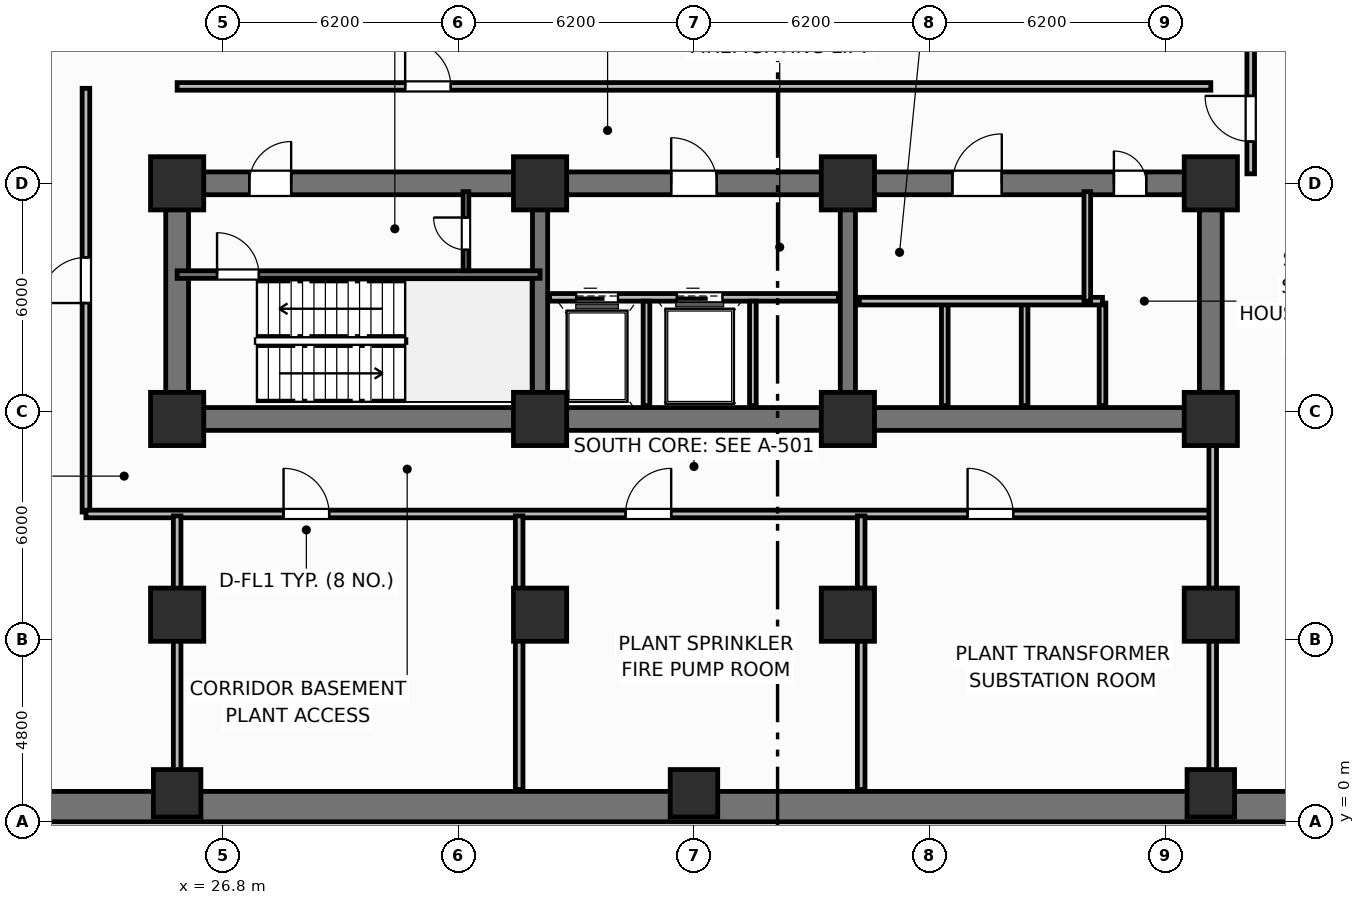
"""IFC4 building model, lengths in metres.
Left out: names, types, materials, properties, quantities, classifications, styles, units other than length and angle.
Written with IfcOpenShell. Run it as: python <this file> out.ifc"""

import sys

from ifc_helpers import new_model, si_unit, direction, frame, frame_2d, origin, origin_2d, place, context, subcontext, project, spatial, rectangle, extrude, element, fill, save


model = new_model("IFC4")
c1 = context("Model", 3, precision=1e-05, world=origin(), true_north=direction((0.0, 1.0)))
c2 = subcontext(c1, "Body", "Model", "MODEL_VIEW")
j1 = project(units=[si_unit("LENGTHUNIT", "METRE"), si_unit("PLANEANGLEUNIT", "RADIAN")], contexts=[c1])
p1 = place(None, origin())
s1 = spatial("IfcSite", under=j1, at=p1, CompositionType="ELEMENT")
p2 = place(p1, origin())
s2 = spatial("IfcBuilding", under=s1, at=p2, CompositionType="ELEMENT")
p3 = place(p2, frame((0.0, 0.0, -4.8)))
s3 = spatial("IfcBuildingStorey", under=s2, at=p3, CompositionType="ELEMENT", Elevation=-4.8)
p4 = place(p3, frame((0.0, 0.4, 0.0), z_axis=(0.0, 0.0, 1.0), x_axis=(1.0, 0.0, 0.0)))
e1 = element("IfcWall", 1, at=p4, inside=s3, PredefinedType="USERDEFINED", context=c2, shape_type="SweptSolid", body=[
    extrude(rectangle(XDim=78.4, YDim=0.8, at=frame_2d((39.2, 0.0))), origin(), (0.0, 0.0, 1.0), 4.8),
])
p5 = place(p3, frame((52.8, 10.6, 0.0), z_axis=(0.0, 0.0, 1.0), x_axis=(-1.0, 0.0, 0.0)))
e2 = element("IfcWall", 2, at=p5, inside=s3, PredefinedType="SHEAR", context=c2, shape_type="SweptSolid", body=[
    extrude(rectangle(XDim=27.2, YDim=0.6, at=frame_2d((13.6, 0.0))), origin(), (0.0, 0.0, 1.0), 4.8),
])
for number, where, z_axis, x_axis in (
    (3, (25.6, 10.9, 0.0), (0.0, 0.0, 1.0), (0.0, 1.0, 0.0)),
    (4, (52.8, 10.9, 0.0), (0.0, 0.0, 1.0), (0.0, 1.0, 0.0)),
):
    element("IfcWall", number, at=place(p3, frame(where, z_axis=z_axis, x_axis=x_axis)), inside=s3, PredefinedType="SHEAR", context=c2, shape_type="SweptSolid", body=[
        extrude(rectangle(XDim=5.6, YDim=0.6, at=frame_2d((2.8, 0.0))), origin(), (0.0, 0.0, 1.0), 4.8),
    ])
p6 = place(p3, frame((25.6, 16.8, 0.0), z_axis=(0.0, 0.0, 1.0), x_axis=(1.0, 0.0, 0.0)))
e5 = element("IfcWall", 5, at=p6, inside=s3, PredefinedType="SHEAR", context=c2, shape_type="SweptSolid", body=[
    extrude(rectangle(XDim=27.2, YDim=0.6, at=frame_2d((13.6, 0.0))), origin(), (0.0, 0.0, 1.0), 4.8),
])
p7 = place(p6, frame((1.9, 0.0, 0.0)))
e6 = element("IfcOpeningElement", 6, at=p7, cuts=e5, PredefinedType="OPENING", context=c2, shape_type="SweptSolid", body=[
    extrude(rectangle(XDim=1.1, YDim=2.15, at=frame_2d((0.55, 1.075))), frame((0.0, 0.31, 0.0), z_axis=(0.0, -1.0, 0.0), x_axis=(1.0, 0.0, 0.0)), (0.0, 0.0, 1.0), 0.62),
])
p8 = place(p6, frame((13.0, 0.0, 0.0)))
e7 = element("IfcOpeningElement", 7, at=p8, cuts=e5, PredefinedType="OPENING", context=c2, shape_type="SweptSolid", body=[
    extrude(rectangle(XDim=1.2, YDim=2.15, at=frame_2d((0.6, 1.075))), frame((0.0, 0.31, 0.0), z_axis=(0.0, -1.0, 0.0), x_axis=(1.0, 0.0, 0.0)), (0.0, 0.0, 1.0), 0.62),
])
p9 = place(p6, frame((20.4, 0.0, 0.0)))
e8 = element("IfcOpeningElement", 8, at=p9, cuts=e5, PredefinedType="OPENING", context=c2, shape_type="SweptSolid", body=[
    extrude(rectangle(XDim=1.3, YDim=2.2, at=frame_2d((0.65, 1.1))), frame((0.0, 0.31, 0.0), z_axis=(0.0, -1.0, 0.0), x_axis=(1.0, 0.0, 0.0)), (0.0, 0.0, 1.0), 0.62),
])
p10 = place(p6, frame((24.65, 0.0, 0.0)))
e9 = element("IfcOpeningElement", 9, at=p10, cuts=e5, PredefinedType="OPENING", context=c2, shape_type="SweptSolid", body=[
    extrude(rectangle(XDim=0.85, YDim=2.1, at=frame_2d((0.425, 1.05))), frame((0.0, 0.31, 0.0), z_axis=(0.0, -1.0, 0.0), x_axis=(1.0, 0.0, 0.0)), (0.0, 0.0, 1.0), 0.62),
])
for number, where, z_axis, x_axis in (
    (10, (35.15, 10.9, 0.0), (0.0, 0.0, 1.0), (0.0, 1.0, 0.0)),
    (11, (43.25, 10.9, 0.0), (0.0, 0.0, 1.0), (0.0, 1.0, 0.0)),
):
    element("IfcWall", number, at=place(p3, frame(where, z_axis=z_axis, x_axis=x_axis)), inside=s3, PredefinedType="SHEAR", context=c2, shape_type="SweptSolid", body=[
        extrude(rectangle(XDim=5.6, YDim=0.4, at=frame_2d((2.8, 0.0))), origin(), (0.0, 0.0, 1.0), 4.8),
    ])
for number, where, z_axis, x_axis in (
    (12, (25.6, 10.6, 0.0), (0.0, 0.0, 1.0), (1.0, 0.0, 0.0)),
    (13, (25.6, 16.8, 0.0), (0.0, 0.0, 1.0), (1.0, 0.0, 0.0)),
    (14, (35.15, 10.6, 0.0), (0.0, 0.0, 1.0), (1.0, 0.0, 0.0)),
    (15, (35.15, 16.8, 0.0), (0.0, 0.0, 1.0), (1.0, 0.0, 0.0)),
    (16, (43.25, 10.6, 0.0), (0.0, 0.0, 1.0), (1.0, 0.0, 0.0)),
    (17, (43.25, 16.8, 0.0), (0.0, 0.0, 1.0), (1.0, 0.0, 0.0)),
    (18, (52.8, 10.6, 0.0), (0.0, 0.0, 1.0), (1.0, 0.0, 0.0)),
    (19, (52.8, 16.8, 0.0), (0.0, 0.0, 1.0), (1.0, 0.0, 0.0)),
):
    element("IfcColumn", number, at=place(p3, frame(where, z_axis=z_axis, x_axis=x_axis)), inside=s3, PredefinedType="COLUMN", context=c2, shape_type="SweptSolid", body=[
        extrude(rectangle(XDim=1.4, YDim=1.4, at=origin_2d()), origin(), (0.0, 0.0, 1.0), 4.8),
    ])
for number, where, z_axis, x_axis in (
    (20, (25.6, 0.75, 0.0), (0.0, 0.0, 1.0), (1.0, 0.0, 0.0)),
    (21, (39.2, 0.75, 0.0), (0.0, 0.0, 1.0), (1.0, 0.0, 0.0)),
    (22, (52.8, 0.75, 0.0), (0.0, 0.0, 1.0), (1.0, 0.0, 0.0)),
):
    element("IfcColumn", number, at=place(p3, frame(where, z_axis=z_axis, x_axis=x_axis)), inside=s3, PredefinedType="COLUMN", context=c2, shape_type="SweptSolid", body=[
        extrude(rectangle(XDim=1.25, YDim=1.25, at=origin_2d()), origin(), (0.0, 0.0, 1.0), 4.8),
    ])
for number, where, z_axis, x_axis in (
    (23, (25.6, 5.45, 0.0), (0.0, 0.0, 1.0), (1.0, 0.0, 0.0)),
    (24, (35.15, 5.45, 0.0), (0.0, 0.0, 1.0), (1.0, 0.0, 0.0)),
    (25, (43.25, 5.45, 0.0), (0.0, 0.0, 1.0), (1.0, 0.0, 0.0)),
    (26, (52.8, 5.45, 0.0), (0.0, 0.0, 1.0), (1.0, 0.0, 0.0)),
):
    element("IfcColumn", number, at=place(p3, frame(where, z_axis=z_axis, x_axis=x_axis)), inside=s3, PredefinedType="COLUMN", context=c2, shape_type="SweptSolid", body=[
        extrude(rectangle(XDim=1.4, YDim=1.4, at=origin_2d()), origin(), (0.0, 0.0, 1.0), 4.8),
    ])
p11 = place(p3, frame((25.6, 14.4, 0.0), z_axis=(0.0, 0.0, 1.0), x_axis=(1.0, 0.0, 0.0)))
e27 = element("IfcWall", 27, at=p11, inside=s3, PredefinedType="SHEAR", context=c2, shape_type="SweptSolid", body=[
    extrude(rectangle(XDim=9.55, YDim=0.2, at=frame_2d((4.775, 0.0))), origin(), (0.0, 0.0, 1.0), 4.8),
])
p12 = place(p11, frame((1.05, 0.0, 0.0)))
e28 = element("IfcOpeningElement", 28, at=p12, cuts=e27, PredefinedType="OPENING", context=c2, shape_type="SweptSolid", body=[
    extrude(rectangle(XDim=1.1, YDim=2.15, at=frame_2d((0.55, 1.075))), frame((0.0, 0.11, 0.0), z_axis=(0.0, -1.0, 0.0), x_axis=(1.0, 0.0, 0.0)), (0.0, 0.0, 1.0), 0.22),
])
p13 = place(p3, frame((33.2, 14.5, 0.0), z_axis=(0.0, 0.0, 1.0), x_axis=(0.0, 1.0, 0.0)))
e29 = element("IfcWall", 29, at=p13, inside=s3, PredefinedType="PARTITIONING", context=c2, shape_type="SweptSolid", body=[
    extrude(rectangle(XDim=2.08, YDim=0.15, at=frame_2d((1.04, 0.0))), origin(), (0.0, 0.0, 1.0), 3.67),
])
p14 = place(p13, frame((0.55, 0.0, 0.0)))
e30 = element("IfcOpeningElement", 30, at=p14, cuts=e29, PredefinedType="OPENING", context=c2, shape_type="SweptSolid", body=[
    extrude(rectangle(XDim=0.85, YDim=2.05, at=frame_2d((0.425, 1.025))), frame((0.0, 0.085, 0.0), z_axis=(0.0, -1.0, 0.0), x_axis=(1.0, 0.0, 0.0)), (0.0, 0.0, 1.0), 0.17),
])
p15 = place(p3, frame((35.4, 13.8, 0.0), z_axis=(0.0, 0.0, 1.0), x_axis=(1.0, 0.0, 0.0)))
e31 = element("IfcWall", 31, at=p15, inside=s3, PredefinedType="PARTITIONING", context=c2, shape_type="SweptSolid", body=[
    extrude(rectangle(XDim=7.6, YDim=0.2, at=frame_2d((3.8, 0.0))), origin(), (0.0, 0.0, 1.0), 3.33),
])
p16 = place(p15, frame((0.7, 0.0, 0.0)))
e32 = element("IfcOpeningElement", 32, at=p16, cuts=e31, PredefinedType="OPENING", context=c2, shape_type="SweptSolid", body=[
    extrude(rectangle(XDim=1.1, YDim=2.15, at=frame_2d((0.55, 1.075))), frame((0.0, 0.11, 0.0), z_axis=(0.0, -1.0, 0.0), x_axis=(1.0, 0.0, 0.0)), (0.0, 0.0, 1.0), 0.22),
])
p17 = place(p15, frame((3.35, 0.0, 0.0)))
e33 = element("IfcOpeningElement", 33, at=p17, cuts=e31, PredefinedType="OPENING", context=c2, shape_type="SweptSolid", body=[
    extrude(rectangle(XDim=1.2, YDim=2.15, at=frame_2d((0.6, 1.075))), frame((0.0, 0.11, 0.0), z_axis=(0.0, -1.0, 0.0), x_axis=(1.0, 0.0, 0.0)), (0.0, 0.0, 1.0), 0.22),
])
for number, where, z_axis, x_axis in (
    (34, (37.95, 10.95, 0.0), (0.0, 0.0, 1.0), (0.0, 1.0, 0.0)),
    (35, (40.75, 10.95, 0.0), (0.0, 0.0, 1.0), (0.0, 1.0, 0.0)),
):
    element("IfcWall", number, at=place(p3, frame(where, z_axis=z_axis, x_axis=x_axis)), inside=s3, PredefinedType="PARTITIONING", context=c2, shape_type="SweptSolid", body=[
        extrude(rectangle(XDim=2.75, YDim=0.175, at=frame_2d((1.375, 0.0))), origin(), (0.0, 0.0, 1.0), 3.67),
    ])
for number, where, z_axis, x_axis in (
    (36, (45.8, 10.95, 0.0), (0.0, 0.0, 1.0), (0.0, 1.0, 0.0)),
    (37, (47.9, 10.95, 0.0), (0.0, 0.0, 1.0), (0.0, 1.0, 0.0)),
    (38, (49.95, 10.95, 0.0), (0.0, 0.0, 1.0), (0.0, 1.0, 0.0)),
):
    element("IfcWall", number, at=place(p3, frame(where, z_axis=z_axis, x_axis=x_axis)), inside=s3, PredefinedType="PARTITIONING", context=c2, shape_type="SweptSolid", body=[
        extrude(rectangle(XDim=2.7, YDim=0.175, at=frame_2d((1.35, 0.0))), origin(), (0.0, 0.0, 1.0), 3.67),
    ])
p18 = place(p3, frame((43.55, 13.7, 0.0), z_axis=(0.0, 0.0, 1.0), x_axis=(1.0, 0.0, 0.0)))
e39 = element("IfcWall", 39, at=p18, inside=s3, PredefinedType="PARTITIONING", context=c2, shape_type="SweptSolid", body=[
    extrude(rectangle(XDim=6.4, YDim=0.2, at=frame_2d((3.2, 0.0))), origin(), (0.0, 0.0, 1.0), 3.67),
])
p19 = place(p3, frame((49.55, 13.7, 0.0), z_axis=(0.0, 0.0, 1.0), x_axis=(0.0, 1.0, 0.0)))
e40 = element("IfcWall", 40, at=p19, inside=s3, PredefinedType="PARTITIONING", context=c2, shape_type="SweptSolid", body=[
    extrude(rectangle(XDim=2.88, YDim=0.175, at=frame_2d((1.44, 0.0))), origin(), (0.0, 0.0, 1.0), 3.67),
])
p20 = place(p3, frame((25.6, 19.35, 0.0), z_axis=(0.0, 0.0, 1.0), x_axis=(1.0, 0.0, 0.0)))
e41 = element("IfcWall", 41, at=p20, inside=s3, PredefinedType="PARTITIONING", context=c2, shape_type="SweptSolid", body=[
    extrude(rectangle(XDim=27.2, YDim=0.2, at=frame_2d((13.6, 0.0))), origin(), (0.0, 0.0, 1.0), 3.67),
])
p21 = place(p20, frame((6.0, 0.0, 0.0)))
e42 = element("IfcOpeningElement", 42, at=p21, cuts=e41, PredefinedType="OPENING", context=c2, shape_type="SweptSolid", body=[
    extrude(rectangle(XDim=1.2, YDim=2.15, at=frame_2d((0.6, 1.075))), frame((0.0, 0.11, 0.0), z_axis=(0.0, -1.0, 0.0), x_axis=(1.0, 0.0, 0.0)), (0.0, 0.0, 1.0), 0.22),
])
p22 = place(p3, frame((23.2, 8.15, 0.0), z_axis=(0.0, 0.0, 1.0), x_axis=(0.0, 1.0, 0.0)))
e43 = element("IfcWall", 43, at=p22, inside=s3, PredefinedType="PARTITIONING", context=c2, shape_type="SweptSolid", body=[
    extrude(rectangle(XDim=11.15, YDim=0.2, at=frame_2d((5.575, 0.0))), origin(), (0.0, 0.0, 1.0), 3.67),
])
p23 = place(p22, frame((5.5, 0.0, 0.0)))
e44 = element("IfcOpeningElement", 44, at=p23, cuts=e43, PredefinedType="OPENING", context=c2, shape_type="SweptSolid", body=[
    extrude(rectangle(XDim=1.2, YDim=2.15, at=frame_2d((0.6, 1.075))), frame((0.0, 0.11, 0.0), z_axis=(0.0, -1.0, 0.0), x_axis=(1.0, 0.0, 0.0)), (0.0, 0.0, 1.0), 0.22),
])
p24 = place(p3, frame((53.85, 17.05, 0.0), z_axis=(0.0, 0.0, 1.0), x_axis=(0.0, 1.0, 0.0)))
e45 = element("IfcWall", 45, at=p24, inside=s3, PredefinedType="PARTITIONING", context=c2, shape_type="SweptSolid", body=[
    extrude(rectangle(XDim=22.3, YDim=0.2, at=frame_2d((11.15, 0.0))), origin(), (0.0, 0.0, 1.0), 3.67),
])
p25 = place(p24, frame((0.85, 0.0, 0.0)))
e46 = element("IfcOpeningElement", 46, at=p25, cuts=e45, PredefinedType="OPENING", context=c2, shape_type="SweptSolid", body=[
    extrude(rectangle(XDim=1.2, YDim=2.15, at=frame_2d((0.6, 1.075))), frame((0.0, 0.11, 0.0), z_axis=(0.0, -1.0, 0.0), x_axis=(1.0, 0.0, 0.0)), (0.0, 0.0, 1.0), 0.22),
])
p26 = place(p24, frame((20.1, 0.0, 0.0)))
e47 = element("IfcOpeningElement", 47, at=p26, cuts=e45, PredefinedType="OPENING", context=c2, shape_type="SweptSolid", body=[
    extrude(rectangle(XDim=1.2, YDim=2.15, at=frame_2d((0.6, 1.075))), frame((0.0, 0.11, 0.0), z_axis=(0.0, -1.0, 0.0), x_axis=(1.0, 0.0, 0.0)), (0.0, 0.0, 1.0), 0.22),
])
p27 = place(p3, frame((23.2, 8.1, 0.0), z_axis=(0.0, 0.0, 1.0), x_axis=(1.0, 0.0, 0.0)))
e48 = element("IfcWall", 48, at=p27, inside=s3, PredefinedType="PARTITIONING", context=c2, shape_type="SweptSolid", body=[
    extrude(rectangle(XDim=29.65, YDim=0.2, at=frame_2d((14.825, 0.0))), origin(), (0.0, 0.0, 1.0), 3.67),
])
p28 = place(p27, frame((5.2, 0.0, 0.0)))
e49 = element("IfcOpeningElement", 49, at=p28, cuts=e48, PredefinedType="OPENING", context=c2, shape_type="SweptSolid", body=[
    extrude(rectangle(XDim=1.2, YDim=2.15, at=frame_2d((0.6, 1.075))), frame((0.0, 0.11, 0.0), z_axis=(0.0, -1.0, 0.0), x_axis=(1.0, 0.0, 0.0)), (0.0, 0.0, 1.0), 0.22),
])
p29 = place(p27, frame((14.2, 0.0, 0.0)))
e50 = element("IfcOpeningElement", 50, at=p29, cuts=e48, PredefinedType="OPENING", context=c2, shape_type="SweptSolid", body=[
    extrude(rectangle(XDim=1.2, YDim=2.15, at=frame_2d((0.6, 1.075))), frame((0.0, 0.11, 0.0), z_axis=(0.0, -1.0, 0.0), x_axis=(1.0, 0.0, 0.0)), (0.0, 0.0, 1.0), 0.22),
])
p30 = place(p27, frame((23.2, 0.0, 0.0)))
e51 = element("IfcOpeningElement", 51, at=p30, cuts=e48, PredefinedType="OPENING", context=c2, shape_type="SweptSolid", body=[
    extrude(rectangle(XDim=1.2, YDim=2.15, at=frame_2d((0.6, 1.075))), frame((0.0, 0.11, 0.0), z_axis=(0.0, -1.0, 0.0), x_axis=(1.0, 0.0, 0.0)), (0.0, 0.0, 1.0), 0.22),
])
p31 = place(p3, frame((52.85, 0.85, 0.0), z_axis=(0.0, 0.0, 1.0), x_axis=(0.0, 1.0, 0.0)))
e52 = element("IfcWall", 52, at=p31, inside=s3, PredefinedType="PARTITIONING", context=c2, shape_type="SweptSolid", body=[
    extrude(rectangle(XDim=9.4, YDim=0.2, at=frame_2d((4.7, 0.0))), origin(), (0.0, 0.0, 1.0), 3.67),
])
for number, where, z_axis, x_axis in (
    (53, (25.6, 0.85, 0.0), (0.0, 0.0, 1.0), (0.0, 1.0, 0.0)),
    (54, (34.6, 0.85, 0.0), (0.0, 0.0, 1.0), (0.0, 1.0, 0.0)),
    (55, (43.6, 0.85, 0.0), (0.0, 0.0, 1.0), (0.0, 1.0, 0.0)),
):
    element("IfcWall", number, at=place(p3, frame(where, z_axis=z_axis, x_axis=x_axis)), inside=s3, PredefinedType="PARTITIONING", context=c2, shape_type="SweptSolid", body=[
        extrude(rectangle(XDim=7.2, YDim=0.2, at=frame_2d((3.6, 0.0))), origin(), (0.0, 0.0, 1.0), 3.67),
    ])
p32 = place(p12, origin())
e56 = element("IfcDoor", 56, at=p32, inside=s3, OperationType="SINGLE_SWING_LEFT", PredefinedType="DOOR", context=c2, shape_type="SweptSolid", body=[
    extrude(rectangle(XDim=1.1, YDim=2.15, at=frame_2d((0.55, 1.075))), frame((0.0, 0.025, 0.0), z_axis=(0.0, -1.0, 0.0), x_axis=(1.0, 0.0, 0.0)), (0.0, 0.0, 1.0), 0.05),
])
fill(e28, e56)
p33 = place(p14, origin())
e57 = element("IfcDoor", 57, at=p33, inside=s3, OperationType="SINGLE_SWING_RIGHT", PredefinedType="TRAPDOOR", context=c2, shape_type="SweptSolid", body=[
    extrude(rectangle(XDim=0.85, YDim=2.05, at=frame_2d((0.425, 1.025))), frame((0.0, 0.025, 0.0), z_axis=(0.0, -1.0, 0.0), x_axis=(1.0, 0.0, 0.0)), (0.0, 0.0, 1.0), 0.05),
])
fill(e30, e57)
p34 = place(p16, origin())
e58 = element("IfcDoor", 58, at=p34, inside=s3, OperationType="SLIDING_TO_LEFT", PredefinedType="DOOR", context=c2, shape_type="SweptSolid", body=[
    extrude(rectangle(XDim=1.1, YDim=2.15, at=frame_2d((0.55, 1.075))), frame((0.0, 0.025, 0.0), z_axis=(0.0, -1.0, 0.0), x_axis=(1.0, 0.0, 0.0)), (0.0, 0.0, 1.0), 0.05),
])
fill(e32, e58)
p35 = place(p17, origin())
e59 = element("IfcDoor", 59, at=p35, inside=s3, OperationType="SLIDING_TO_LEFT", PredefinedType="DOOR", context=c2, shape_type="SweptSolid", body=[
    extrude(rectangle(XDim=1.2, YDim=2.15, at=frame_2d((0.6, 1.075))), frame((0.0, 0.025, 0.0), z_axis=(0.0, -1.0, 0.0), x_axis=(1.0, 0.0, 0.0)), (0.0, 0.0, 1.0), 0.05),
])
fill(e33, e59)
p36 = place(p21, origin())
e60 = element("IfcDoor", 60, at=p36, inside=s3, OperationType="SINGLE_SWING_LEFT", PredefinedType="DOOR", context=c2, shape_type="SweptSolid", body=[
    extrude(rectangle(XDim=1.2, YDim=2.15, at=frame_2d((0.6, 1.075))), frame((0.0, 0.025, 0.0), z_axis=(0.0, -1.0, 0.0), x_axis=(1.0, 0.0, 0.0)), (0.0, 0.0, 1.0), 0.05),
])
fill(e42, e60)
p37 = place(p23, origin())
e61 = element("IfcDoor", 61, at=p37, inside=s3, OperationType="SINGLE_SWING_LEFT", PredefinedType="DOOR", context=c2, shape_type="SweptSolid", body=[
    extrude(rectangle(XDim=1.2, YDim=2.15, at=frame_2d((0.6, 1.075))), frame((0.0, 0.025, 0.0), z_axis=(0.0, -1.0, 0.0), x_axis=(1.0, 0.0, 0.0)), (0.0, 0.0, 1.0), 0.05),
])
fill(e44, e61)
p38 = place(p25, origin())
e62 = element("IfcDoor", 62, at=p38, inside=s3, OperationType="SINGLE_SWING_RIGHT", PredefinedType="DOOR", context=c2, shape_type="SweptSolid", body=[
    extrude(rectangle(XDim=1.2, YDim=2.15, at=frame_2d((0.6, 1.075))), frame((0.0, 0.025, 0.0), z_axis=(0.0, -1.0, 0.0), x_axis=(1.0, 0.0, 0.0)), (0.0, 0.0, 1.0), 0.05),
])
fill(e46, e62)
p39 = place(p28, origin())
e63 = element("IfcDoor", 63, at=p39, inside=s3, OperationType="SINGLE_SWING_LEFT", PredefinedType="DOOR", context=c2, shape_type="SweptSolid", body=[
    extrude(rectangle(XDim=1.2, YDim=2.15, at=frame_2d((0.6, 1.075))), frame((0.0, 0.025, 0.0), z_axis=(0.0, -1.0, 0.0), x_axis=(1.0, 0.0, 0.0)), (0.0, 0.0, 1.0), 0.05),
])
fill(e49, e63)
p40 = place(p29, origin())
e64 = element("IfcDoor", 64, at=p40, inside=s3, OperationType="SINGLE_SWING_RIGHT", PredefinedType="DOOR", context=c2, shape_type="SweptSolid", body=[
    extrude(rectangle(XDim=1.2, YDim=2.15, at=frame_2d((0.6, 1.075))), frame((0.0, 0.025, 0.0), z_axis=(0.0, -1.0, 0.0), x_axis=(1.0, 0.0, 0.0)), (0.0, 0.0, 1.0), 0.05),
])
fill(e50, e64)
p41 = place(p30, origin())
e65 = element("IfcDoor", 65, at=p41, inside=s3, OperationType="SINGLE_SWING_LEFT", PredefinedType="DOOR", context=c2, shape_type="SweptSolid", body=[
    extrude(rectangle(XDim=1.2, YDim=2.15, at=frame_2d((0.6, 1.075))), frame((0.0, 0.025, 0.0), z_axis=(0.0, -1.0, 0.0), x_axis=(1.0, 0.0, 0.0)), (0.0, 0.0, 1.0), 0.05),
])
fill(e51, e65)
p42 = place(p7, origin())
e66 = element("IfcDoor", 66, at=p42, inside=s3, OperationType="SINGLE_SWING_RIGHT", PredefinedType="DOOR", context=c2, shape_type="SweptSolid", body=[
    extrude(rectangle(XDim=1.1, YDim=2.15, at=frame_2d((0.55, 1.075))), frame((0.0, 0.025, 0.0), z_axis=(0.0, -1.0, 0.0), x_axis=(1.0, 0.0, 0.0)), (0.0, 0.0, 1.0), 0.05),
])
fill(e6, e66)
p43 = place(p8, origin())
e67 = element("IfcDoor", 67, at=p43, inside=s3, OperationType="SINGLE_SWING_LEFT", PredefinedType="DOOR", context=c2, shape_type="SweptSolid", body=[
    extrude(rectangle(XDim=1.2, YDim=2.15, at=frame_2d((0.6, 1.075))), frame((0.0, 0.025, 0.0), z_axis=(0.0, -1.0, 0.0), x_axis=(1.0, 0.0, 0.0)), (0.0, 0.0, 1.0), 0.05),
])
fill(e7, e67)
p44 = place(p9, origin())
e68 = element("IfcDoor", 68, at=p44, inside=s3, OperationType="SINGLE_SWING_RIGHT", PredefinedType="DOOR", context=c2, shape_type="SweptSolid", body=[
    extrude(rectangle(XDim=1.3, YDim=2.2, at=frame_2d((0.65, 1.1))), frame((0.0, 0.025, 0.0), z_axis=(0.0, -1.0, 0.0), x_axis=(1.0, 0.0, 0.0)), (0.0, 0.0, 1.0), 0.05),
])
fill(e8, e68)
p45 = place(p10, origin())
e69 = element("IfcDoor", 69, at=p45, inside=s3, OperationType="SINGLE_SWING_LEFT", PredefinedType="DOOR", context=c2, shape_type="SweptSolid", body=[
    extrude(rectangle(XDim=0.85, YDim=2.1, at=frame_2d((0.425, 1.05))), frame((0.0, 0.025, 0.0), z_axis=(0.0, -1.0, 0.0), x_axis=(1.0, 0.0, 0.0)), (0.0, 0.0, 1.0), 0.05),
])
fill(e9, e69)
save(model, sys.argv[1])
